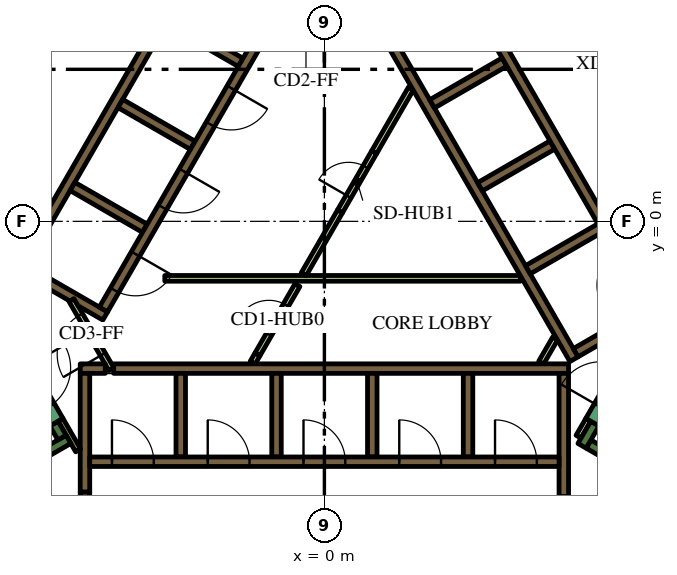
"""IFC4 building model, lengths in metres.
Left out: names, types, materials, properties, quantities, classifications, styles, units other than length and angle.
Written with IfcOpenShell. Run it as: python <this file> out.ifc"""

import sys

from ifc_helpers import new_model, si_unit, direction, frame, frame_2d, origin, place, context, subcontext, project, spatial, polyline, rectangle, outline, extrude, element, fill, save


model = new_model("IFC4")
c1 = context("Model", 3, precision=1e-05, world=origin(), true_north=direction((0.0, 1.0)))
c2 = subcontext(c1, "Body", "Model", "MODEL_VIEW")
j1 = project(units=[si_unit("LENGTHUNIT", "METRE"), si_unit("PLANEANGLEUNIT", "RADIAN")], contexts=[c1])
p1 = place(None, origin())
s1 = spatial("IfcSite", under=j1, at=p1, CompositionType="ELEMENT")
p2 = place(p1, origin())
s2 = spatial("IfcBuilding", under=s1, at=p2, CompositionType="ELEMENT")
p3 = place(p2, frame((0.0, 0.0, 171.0)))
s3 = spatial("IfcBuildingStorey", under=s2, at=p3, CompositionType="ELEMENT", Elevation=171.0)
p4 = place(p3, frame((-12.668, -1.842, 0.0), z_axis=(0.0, 0.0, 1.0), x_axis=(0.500003640647, 0.866023301845, 0.0)))
e1 = element("IfcWall", 1, at=p4, inside=s3, PredefinedType="SOLIDWALL", context=c2, shape_type="SweptSolid", body=[
    extrude(rectangle(XDim=15.858, YDim=0.8, at=frame_2d((7.929, 0.0))), origin(), (0.0, 0.0, 1.0), 4.2),
])
p5 = place(p3, frame((12.84, -9.261, 0.0), z_axis=(0.0, 0.0, 1.0), x_axis=(-0.866013990052, 0.500019768644, 0.0)))
e2 = element("IfcWall", 2, at=p5, inside=s3, PredefinedType="SOLIDWALL", context=c2, shape_type="SweptSolid", body=[
    extrude(rectangle(XDim=6.8, YDim=0.25, at=frame_2d((3.4, 0.0))), origin(), (0.0, 0.0, 1.0), 4.2),
])
p6 = place(p3, frame((6.78, -5.906, 0.0), z_axis=(0.0, 0.0, 1.0), x_axis=(0.500223362819, 0.865896406789, 0.0)))
e3 = element("IfcWall", 3, at=p6, inside=s3, PredefinedType="SOLIDWALL", context=c2, shape_type="SweptSolid", body=[
    extrude(rectangle(XDim=0.675, YDim=0.25, at=frame_2d((0.337, 0.0))), origin(), (0.0, 0.0, 1.0), 4.2),
])
p7 = place(p3, frame((-12.84, -9.261, 0.0), z_axis=(0.0, 0.0, 1.0), x_axis=(0.866016039709, 0.500016218704, 0.0)))
e4 = element("IfcWall", 4, at=p7, inside=s3, PredefinedType="SOLIDWALL", context=c2, shape_type="SweptSolid", body=[
    extrude(rectangle(XDim=7.05, YDim=0.25, at=frame_2d((3.525, 0.0))), origin(), (0.0, 0.0, 1.0), 4.2),
])
p8 = place(p3, frame((-6.905, -5.69, 0.0), z_axis=(0.0, 0.0, 1.0), x_axis=(-0.500402024738, 0.865793170242, 0.0)))
e5 = element("IfcWall", 5, at=p8, inside=s3, PredefinedType="SOLIDWALL", context=c2, shape_type="SweptSolid", body=[
    extrude(rectangle(XDim=0.425, YDim=0.25, at=frame_2d((0.212, 0.0))), origin(), (0.0, 0.0, 1.0), 4.2),
])
p9 = place(p3, frame((-5.545, -3.875, 0.0), z_axis=(0.0, 0.0, 1.0), x_axis=(1.0, 0.0, 0.0)))
e6 = element("IfcWall", 6, at=p9, inside=s3, PredefinedType="SOLIDWALL", context=c2, shape_type="SweptSolid", body=[
    extrude(rectangle(XDim=11.97, YDim=0.25, at=frame_2d((5.985, 0.0))), origin(), (0.0, 0.0, 1.0), 4.2),
])
p10 = place(p3, frame((-6.425, -3.875, 0.0), z_axis=(0.0, 0.0, 1.0), x_axis=(1.0, 0.0, 0.0)))
e7 = element("IfcWall", 7, at=p10, inside=s3, PredefinedType="SOLIDWALL", context=c2, shape_type="SweptSolid", body=[
    extrude(rectangle(XDim=0.658, YDim=0.25, at=frame_2d((0.329, 0.0))), origin(), (0.0, 0.0, 1.0), 4.2),
])
p11 = place(p3, frame((6.3, -7.24, 0.0), z_axis=(0.0, 0.0, 1.0), x_axis=(0.0, 1.0, 0.0)))
e8 = element("IfcWall", 8, at=p11, inside=s3, PredefinedType="SOLIDWALL", context=c2, shape_type="SweptSolid", body=[
    extrude(rectangle(XDim=3.24, YDim=0.25, at=frame_2d((1.62, 0.0))), origin(), (0.0, 0.0, 1.0), 4.2),
])
for number, where, z_axis, x_axis in (
    (9, (3.78, -4.0, 0.0), (0.0, 0.0, 1.0), (0.0, -1.0, 0.0)),
    (10, (1.26, -4.0, 0.0), (0.0, 0.0, 1.0), (0.0, -1.0, 0.0)),
    (11, (-1.26, -4.0, 0.0), (0.0, 0.0, 1.0), (0.0, -1.0, 0.0)),
    (12, (-3.78, -4.0, 0.0), (0.0, 0.0, 1.0), (0.0, -1.0, 0.0)),
):
    element("IfcWall", number, at=place(p3, frame(where, z_axis=z_axis, x_axis=x_axis)), inside=s3, PredefinedType="SOLIDWALL", context=c2, shape_type="SweptSolid", body=[
        extrude(rectangle(XDim=2.2, YDim=0.25, at=frame_2d((1.1, 0.0))), origin(), (0.0, 0.0, 1.0), 4.2),
    ])
p12 = place(p3, frame((-6.3, -7.125, 0.0), z_axis=(0.0, 0.0, 1.0), x_axis=(0.0, 1.0, 0.0)))
e13 = element("IfcWall", 13, at=p12, inside=s3, PredefinedType="SOLIDWALL", context=c2, shape_type="SweptSolid", body=[
    extrude(rectangle(XDim=3.125, YDim=0.25, at=frame_2d((1.562, 0.0))), origin(), (0.0, 0.0, 1.0), 4.2),
])
p13 = place(p3, frame((6.568, -3.627, 0.0), z_axis=(0.0, 0.0, 1.0), x_axis=(-0.499999455981, 0.866025717874, 0.0)))
e14 = element("IfcWall", 14, at=p13, inside=s3, PredefinedType="SOLIDWALL", context=c2, shape_type="SweptSolid", body=[
    extrude(rectangle(XDim=11.978, YDim=0.25, at=frame_2d((5.989, 0.0))), origin(), (0.0, 0.0, 1.0), 4.2),
])
for number, where, z_axis, x_axis in (
    (15, (2.834, 3.091, 0.0), (0.0, 0.0, 1.0), (0.866, 0.5, 0.0)),
    (16, (4.094, 0.909, 0.0), (0.0, 0.0, 1.0), (0.866, 0.5, 0.0)),
    (17, (5.354, -1.274, 0.0), (0.0, 0.0, 1.0), (0.866, 0.5, 0.0)),
):
    element("IfcWall", number, at=place(p3, frame(where, z_axis=z_axis, x_axis=x_axis)), inside=s3, PredefinedType="SOLIDWALL", context=c2, shape_type="SweptSolid", body=[
        extrude(rectangle(XDim=2.2, YDim=0.25, at=frame_2d((1.1, 0.0))), origin(), (0.0, 0.0, 1.0), 4.2),
    ])
p14 = place(p3, frame((6.614, -3.456, 0.0), z_axis=(0.0, 0.0, 1.0), x_axis=(0.866025089694, 0.500000544019, 0.0)))
e18 = element("IfcWall", 18, at=p14, inside=s3, PredefinedType="SOLIDWALL", context=c2, shape_type="SweptSolid", body=[
    extrude(rectangle(XDim=2.305, YDim=0.25, at=frame_2d((1.153, 0.0))), origin(), (0.0, 0.0, 1.0), 4.2),
])
p15 = place(p3, frame((-8.06, -1.311, 0.0), z_axis=(0.0, 0.0, 1.0), x_axis=(0.50000273126, 0.866023826885, 0.0)))
e19 = element("IfcWall", 19, at=p15, inside=s3, PredefinedType="SOLIDWALL", context=c2, shape_type="SweptSolid", body=[
    extrude(rectangle(XDim=10.33, YDim=0.25, at=frame_2d((5.165, 0.0))), origin(), (0.0, 0.0, 1.0), 4.2),
])
for number, where, z_axis, x_axis in (
    (20, (-2.204, 4.182, 0.0), (0.0, 0.0, 1.0), (-0.866, 0.5, 0.0)),
    (21, (-5.369, 3.1, 0.0), (0.0, 0.0, 1.0), (0.866, -0.5, 0.0)),
    (22, (-4.724, -0.182, 0.0), (0.0, 0.0, 1.0), (-0.866, 0.5, 0.0)),
):
    element("IfcWall", number, at=place(p3, frame(where, z_axis=z_axis, x_axis=x_axis)), inside=s3, PredefinedType="SOLIDWALL", context=c2, shape_type="SweptSolid", body=[
        extrude(rectangle(XDim=2.2, YDim=0.25, at=frame_2d((1.1, 0.0))), origin(), (0.0, 0.0, 1.0), 4.2),
    ])
p16 = place(p3, origin())
e23 = element("IfcWall", 23, at=p16, inside=s3, PredefinedType="SOLIDWALL", context=c2, shape_type="SweptSolid", body=[
    extrude(outline(polyline([(-5.922, -2.257), (-5.922, -2.257), (-5.705, -2.382), (-5.83, -2.598), (-6.483, -2.221), (-6.591, -2.033), (-6.591, -2.033), (-6.7, -2.096), (-7.952, -1.373), (-7.827, -1.156), (-5.922, -2.257)])), origin(), (0.0, 0.0, 1.0), 4.2),
])
p17 = place(p3, frame((-6.48, -6.027, 0.0), z_axis=(0.0, 0.0, 1.0), x_axis=(-0.499927229454, 0.866067413802, 0.0)))
e24 = element("IfcWall", 24, at=p17, inside=s3, PredefinedType="PARTITIONING", context=c2, shape_type="SweptSolid", body=[
    extrude(rectangle(XDim=0.929, YDim=0.15, at=frame_2d((0.464, 0.0))), origin(), (0.0, 0.0, 1.0), 4.2),
])
p18 = place(p3, frame((6.945, -5.222, 0.0), z_axis=(0.0, 0.0, 1.0), x_axis=(-0.499818422106, -0.866130212453, 0.0)))
e25 = element("IfcWall", 25, at=p18, inside=s3, PredefinedType="PARTITIONING", context=c2, shape_type="SweptSolid", body=[
    extrude(rectangle(XDim=0.514, YDim=0.15, at=frame_2d((0.257, 0.0))), origin(), (0.0, 0.0, 1.0), 3.15),
])
p19 = place(p3, frame((5.705, -3.718, 0.0), z_axis=(0.0, 0.0, 1.0), x_axis=(0.499962090823, 0.866047289552, 0.0)))
e26 = element("IfcWall", 26, at=p19, inside=s3, PredefinedType="PARTITIONING", context=c2, shape_type="SweptSolid", body=[
    extrude(rectangle(XDim=0.735, YDim=0.15, at=frame_2d((0.367, 0.0))), origin(), (0.0, 0.0, 1.0), 3.15),
])
p20 = place(p3, frame((-4.2, -1.5, 0.0), z_axis=(0.0, 0.0, 1.0), x_axis=(1.0, 0.0, 0.0)))
e27 = element("IfcWall", 27, at=p20, inside=s3, PredefinedType="PARTITIONING", context=c2, shape_type="SweptSolid", body=[
    extrude(rectangle(XDim=9.359, YDim=0.15, at=frame_2d((4.68, 0.0))), origin(), (0.0, 0.0, 1.0), 3.15),
])
p21 = place(p3, frame((-0.544, -1.393, 0.0), z_axis=(0.0, 0.0, 1.0), x_axis=(0.499928740635, 0.866066541489, 0.0)))
e28 = element("IfcWall", 28, at=p21, inside=s3, PredefinedType="PARTITIONING", context=c2, shape_type="SweptSolid", body=[
    extrude(rectangle(XDim=1.912, YDim=0.15, at=frame_2d((0.956, 0.0))), origin(), (0.0, 0.0, 1.0), 3.15),
])
p22 = place(p3, frame((1.312, 1.822, 0.0), z_axis=(0.0, 0.0, 1.0), x_axis=(0.500003549559, 0.866023354436, 0.0)))
e29 = element("IfcWall", 29, at=p22, inside=s3, PredefinedType="PARTITIONING", context=c2, shape_type="SweptSolid", body=[
    extrude(rectangle(XDim=1.93, YDim=0.15, at=frame_2d((0.965, 0.0))), origin(), (0.0, 0.0, 1.0), 3.15),
])
p23 = place(p3, frame((-1.887, -3.718, 0.0), z_axis=(0.0, 0.0, 1.0), x_axis=(0.500165633897, 0.865929753888, 0.0)))
e30 = element("IfcWall", 30, at=p23, inside=s3, PredefinedType="PARTITIONING", context=c2, shape_type="SweptSolid", body=[
    extrude(rectangle(XDim=0.254, YDim=0.15, at=frame_2d((0.127, 0.0))), origin(), (0.0, 0.0, 1.0), 3.15),
])
p24 = place(p3, frame((-6.175, -6.325, 0.0), z_axis=(0.0, 0.0, 1.0), x_axis=(1.0, 0.0, 0.0)))
e31 = element("IfcWall", 31, at=p24, inside=s3, PredefinedType="SOLIDWALL", context=c2, shape_type="SweptSolid", body=[
    extrude(rectangle(XDim=12.35, YDim=0.25, at=frame_2d((6.175, 0.0))), origin(), (0.0, 0.0, 1.0), 4.2),
])
p25 = place(p24, frame((0.585, 0.0, 0.0)))
e32 = element("IfcOpeningElement", 32, at=p25, cuts=e31, PredefinedType="OPENING", context=c2, shape_type="SweptSolid", body=[
    extrude(rectangle(XDim=1.1, YDim=2.1, at=frame_2d((0.55, 1.05))), frame((0.0, 0.135, 0.0), z_axis=(0.0, -1.0, 0.0), x_axis=(1.0, 0.0, 0.0)), (0.0, 0.0, 1.0), 0.27),
])
p26 = place(p24, frame((3.105, 0.0, 0.0)))
e33 = element("IfcOpeningElement", 33, at=p26, cuts=e31, PredefinedType="OPENING", context=c2, shape_type="SweptSolid", body=[
    extrude(rectangle(XDim=1.1, YDim=2.1, at=frame_2d((0.55, 1.05))), frame((0.0, 0.135, 0.0), z_axis=(0.0, -1.0, 0.0), x_axis=(1.0, 0.0, 0.0)), (0.0, 0.0, 1.0), 0.27),
])
p27 = place(p24, frame((5.625, 0.0, 0.0)))
e34 = element("IfcOpeningElement", 34, at=p27, cuts=e31, PredefinedType="OPENING", context=c2, shape_type="SweptSolid", body=[
    extrude(rectangle(XDim=1.1, YDim=2.1, at=frame_2d((0.55, 1.05))), frame((0.0, 0.135, 0.0), z_axis=(0.0, -1.0, 0.0), x_axis=(1.0, 0.0, 0.0)), (0.0, 0.0, 1.0), 0.27),
])
p28 = place(p24, frame((8.145, 0.0, 0.0)))
e35 = element("IfcOpeningElement", 35, at=p28, cuts=e31, PredefinedType="OPENING", context=c2, shape_type="SweptSolid", body=[
    extrude(rectangle(XDim=1.1, YDim=2.1, at=frame_2d((0.55, 1.05))), frame((0.0, 0.135, 0.0), z_axis=(0.0, -1.0, 0.0), x_axis=(1.0, 0.0, 0.0)), (0.0, 0.0, 1.0), 0.27),
])
p29 = place(p24, frame((10.665, 0.0, 0.0)))
e36 = element("IfcOpeningElement", 36, at=p29, cuts=e31, PredefinedType="OPENING", context=c2, shape_type="SweptSolid", body=[
    extrude(rectangle(XDim=1.1, YDim=2.1, at=frame_2d((0.55, 1.05))), frame((0.0, 0.135, 0.0), z_axis=(0.0, -1.0, 0.0), x_axis=(1.0, 0.0, 0.0)), (0.0, 0.0, 1.0), 0.27),
])
p30 = place(p3, frame((8.565, -2.185, 0.0), z_axis=(0.0, 0.0, 1.0), x_axis=(-0.499997954832, 0.866026584559, 0.0)))
e37 = element("IfcWall", 37, at=p30, inside=s3, PredefinedType="SOLIDWALL", context=c2, shape_type="SweptSolid", body=[
    extrude(rectangle(XDim=12.35, YDim=0.25, at=frame_2d((6.175, 0.0))), origin(), (0.0, 0.0, 1.0), 4.2),
])
p31 = place(p30, frame((0.585, 0.0, 0.0)))
e38 = element("IfcOpeningElement", 38, at=p31, cuts=e37, PredefinedType="OPENING", context=c2, shape_type="SweptSolid", body=[
    extrude(rectangle(XDim=1.1, YDim=2.1, at=frame_2d((0.55, 1.05))), frame((0.0, 0.135, 0.0), z_axis=(0.0, -1.0, 0.0), x_axis=(1.0, 0.0, 0.0)), (0.0, 0.0, 1.0), 0.27),
])
p32 = place(p3, frame((-0.898, 6.194, 0.0), z_axis=(0.0, 0.0, 1.0), x_axis=(-0.499996202215, -0.866027596426, 0.0)))
e39 = element("IfcWall", 39, at=p32, inside=s3, PredefinedType="SOLIDWALL", context=c2, shape_type="SweptSolid", body=[
    extrude(rectangle(XDim=9.83, YDim=0.25, at=frame_2d((4.915, 0.0))), origin(), (0.0, 0.0, 1.0), 4.2),
])
p33 = place(p32, frame((0.585, 0.0, 0.0)))
e40 = element("IfcOpeningElement", 40, at=p33, cuts=e39, PredefinedType="OPENING", context=c2, shape_type="SweptSolid", body=[
    extrude(rectangle(XDim=1.1, YDim=2.1, at=frame_2d((0.55, 1.05))), frame((0.0, 0.135, 0.0), z_axis=(0.0, -1.0, 0.0), x_axis=(1.0, 0.0, 0.0)), (0.0, 0.0, 1.0), 0.27),
])
p34 = place(p32, frame((3.105, 0.0, 0.0)))
e41 = element("IfcOpeningElement", 41, at=p34, cuts=e39, PredefinedType="OPENING", context=c2, shape_type="SweptSolid", body=[
    extrude(rectangle(XDim=1.1, YDim=2.1, at=frame_2d((0.55, 1.05))), frame((0.0, 0.135, 0.0), z_axis=(0.0, -1.0, 0.0), x_axis=(1.0, 0.0, 0.0)), (0.0, 0.0, 1.0), 0.27),
])
p35 = place(p32, frame((5.625, 0.0, 0.0)))
e42 = element("IfcOpeningElement", 42, at=p35, cuts=e39, PredefinedType="OPENING", context=c2, shape_type="SweptSolid", body=[
    extrude(rectangle(XDim=1.1, YDim=2.1, at=frame_2d((0.55, 1.05))), frame((0.0, 0.135, 0.0), z_axis=(0.0, -1.0, 0.0), x_axis=(1.0, 0.0, 0.0)), (0.0, 0.0, 1.0), 0.27),
])
p36 = place(p32, frame((8.145, 0.0, 0.0)))
e43 = element("IfcOpeningElement", 43, at=p36, cuts=e39, PredefinedType="OPENING", context=c2, shape_type="SweptSolid", body=[
    extrude(rectangle(XDim=1.1, YDim=2.1, at=frame_2d((0.55, 1.05))), frame((0.0, 0.135, 0.0), z_axis=(0.0, -1.0, 0.0), x_axis=(1.0, 0.0, 0.0)), (0.0, 0.0, 1.0), 0.27),
])
p37 = place(p3, frame((7.053, -5.284, 0.0), z_axis=(0.0, 0.0, 1.0), x_axis=(0.500078061341, 0.865980330357, 0.0)))
e44 = element("IfcWall", 44, at=p37, inside=s3, PredefinedType="SOLIDWALL", context=c2, shape_type="SweptSolid", body=[
    extrude(rectangle(XDim=2.1, YDim=0.4, at=frame_2d((1.05, 0.0))), origin(), (0.0, 0.0, 1.0), 4.2),
])
p38 = place(p37, frame((0.45, 0.0, 0.0)))
e45 = element("IfcOpeningElement", 45, at=p38, cuts=e44, PredefinedType="OPENING", context=c2, shape_type="SweptSolid", body=[
    extrude(rectangle(XDim=1.2, YDim=2.1, at=frame_2d((0.6, 1.05))), frame((0.0, 0.21, 0.0), z_axis=(0.0, -1.0, 0.0), x_axis=(1.0, 0.0, 0.0)), (0.0, 0.0, 1.0), 0.42),
])
p39 = place(p3, frame((-8.103, -3.466, 0.0), z_axis=(0.0, 0.0, 1.0), x_axis=(0.500078061341, -0.865980330357, 0.0)))
e46 = element("IfcWall", 46, at=p39, inside=s3, PredefinedType="SOLIDWALL", context=c2, shape_type="SweptSolid", body=[
    extrude(rectangle(XDim=2.1, YDim=0.4, at=frame_2d((1.05, 0.0))), origin(), (0.0, 0.0, 1.0), 4.2),
])
p40 = place(p39, frame((0.45, 0.0, 0.0)))
e47 = element("IfcOpeningElement", 47, at=p40, cuts=e46, PredefinedType="OPENING", context=c2, shape_type="SweptSolid", body=[
    extrude(rectangle(XDim=1.2, YDim=2.1, at=frame_2d((0.6, 1.05))), frame((0.0, 0.21, 0.0), z_axis=(0.0, -1.0, 0.0), x_axis=(1.0, 0.0, 0.0)), (0.0, 0.0, 1.0), 0.42),
])
p41 = place(p3, frame((-6.3, -7.125, 0.0), z_axis=(0.0, 0.0, 1.0), x_axis=(0.0, -1.0, 0.0)))
e48 = element("IfcWall", 48, at=p41, inside=s3, PredefinedType="SOLIDWALL", context=c2, shape_type="SweptSolid", body=[
    extrude(rectangle(XDim=1.8, YDim=0.25, at=frame_2d((0.9, 0.0))), origin(), (0.0, 0.0, 1.0), 4.2),
])
p42 = place(p41, frame((0.45, 0.0, 0.0)))
e49 = element("IfcOpeningElement", 49, at=p42, cuts=e48, PredefinedType="OPENING", context=c2, shape_type="SweptSolid", body=[
    extrude(rectangle(XDim=0.9, YDim=2.1, at=frame_2d((0.45, 1.05))), frame((0.0, 0.135, 0.0), z_axis=(0.0, -1.0, 0.0), x_axis=(1.0, 0.0, 0.0)), (0.0, 0.0, 1.0), 0.27),
])
p43 = place(p3, frame((-1.76, -3.498, 0.0), z_axis=(0.0, 0.0, 1.0), x_axis=(0.499977374825, 0.866038466041, 0.0)))
e50 = element("IfcWall", 50, at=p43, inside=s3, PredefinedType="PARTITIONING", context=c2, shape_type="SweptSolid", body=[
    extrude(rectangle(XDim=2.1, YDim=0.15, at=frame_2d((1.05, 0.0))), origin(), (0.0, 0.0, 1.0), 3.15),
])
p44 = place(p43, frame((0.6, 0.0, 0.0)))
e51 = element("IfcOpeningElement", 51, at=p44, cuts=e50, PredefinedType="OPENING", context=c2, shape_type="SweptSolid", body=[
    extrude(rectangle(XDim=0.9, YDim=2.1, at=frame_2d((0.45, 1.05))), frame((0.0, 0.085, 0.0), z_axis=(0.0, -1.0, 0.0), x_axis=(1.0, 0.0, 0.0)), (0.0, 0.0, 1.0), 0.17),
])
p45 = place(p3, frame((-5.606, -3.89, 0.0), z_axis=(0.0, 0.0, 1.0), x_axis=(-0.500027713859, 0.866009402589, 0.0)))
e52 = element("IfcWall", 52, at=p45, inside=s3, PredefinedType="PARTITIONING", context=c2, shape_type="SweptSolid", body=[
    extrude(rectangle(XDim=2.1, YDim=0.15, at=frame_2d((1.05, 0.0))), origin(), (0.0, 0.0, 1.0), 3.15),
])
p46 = place(p45, frame((0.45, 0.0, 0.0)))
e53 = element("IfcOpeningElement", 53, at=p46, cuts=e52, PredefinedType="OPENING", context=c2, shape_type="SweptSolid", body=[
    extrude(rectangle(XDim=1.2, YDim=2.1, at=frame_2d((0.6, 1.05))), frame((0.0, 0.085, 0.0), z_axis=(0.0, -1.0, 0.0), x_axis=(1.0, 0.0, 0.0)), (0.0, 0.0, 1.0), 0.17),
])
p47 = place(p3, frame((0.412, 0.263, 0.0), z_axis=(0.0, 0.0, 1.0), x_axis=(0.500062916607, 0.865989075817, 0.0)))
e54 = element("IfcWall", 54, at=p47, inside=s3, PredefinedType="PARTITIONING", context=c2, shape_type="SweptSolid", body=[
    extrude(rectangle(XDim=1.8, YDim=0.15, at=frame_2d((0.9, 0.0))), origin(), (0.0, 0.0, 1.0), 3.15),
])
p48 = place(p47, frame((0.45, 0.0, 0.0)))
e55 = element("IfcOpeningElement", 55, at=p48, cuts=e54, PredefinedType="OPENING", context=c2, shape_type="SweptSolid", body=[
    extrude(rectangle(XDim=0.9, YDim=2.1, at=frame_2d((0.45, 1.05))), frame((0.0, 0.085, 0.0), z_axis=(0.0, -1.0, 0.0), x_axis=(1.0, 0.0, 0.0)), (0.0, 0.0, 1.0), 0.17),
])
p49 = place(p25, origin())
e56 = element("IfcDoor", 56, at=p49, inside=s3, OperationType="DOUBLE_DOOR_SLIDING", PredefinedType="DOOR", context=c2, shape_type="SweptSolid", body=[
    extrude(rectangle(XDim=1.1, YDim=2.1, at=frame_2d((0.55, 1.05))), frame((0.0, 0.025, 0.0), z_axis=(0.0, -1.0, 0.0), x_axis=(1.0, 0.0, 0.0)), (0.0, 0.0, 1.0), 0.05),
])
fill(e32, e56)
p50 = place(p26, origin())
e57 = element("IfcDoor", 57, at=p50, inside=s3, OperationType="DOUBLE_DOOR_SLIDING", PredefinedType="DOOR", context=c2, shape_type="SweptSolid", body=[
    extrude(rectangle(XDim=1.1, YDim=2.1, at=frame_2d((0.55, 1.05))), frame((0.0, 0.025, 0.0), z_axis=(0.0, -1.0, 0.0), x_axis=(1.0, 0.0, 0.0)), (0.0, 0.0, 1.0), 0.05),
])
fill(e33, e57)
p51 = place(p27, origin())
e58 = element("IfcDoor", 58, at=p51, inside=s3, OperationType="DOUBLE_DOOR_SLIDING", PredefinedType="DOOR", context=c2, shape_type="SweptSolid", body=[
    extrude(rectangle(XDim=1.1, YDim=2.1, at=frame_2d((0.55, 1.05))), frame((0.0, 0.025, 0.0), z_axis=(0.0, -1.0, 0.0), x_axis=(1.0, 0.0, 0.0)), (0.0, 0.0, 1.0), 0.05),
])
fill(e34, e58)
p52 = place(p28, origin())
e59 = element("IfcDoor", 59, at=p52, inside=s3, OperationType="DOUBLE_DOOR_SLIDING", PredefinedType="DOOR", context=c2, shape_type="SweptSolid", body=[
    extrude(rectangle(XDim=1.1, YDim=2.1, at=frame_2d((0.55, 1.05))), frame((0.0, 0.025, 0.0), z_axis=(0.0, -1.0, 0.0), x_axis=(1.0, 0.0, 0.0)), (0.0, 0.0, 1.0), 0.05),
])
fill(e35, e59)
p53 = place(p29, origin())
e60 = element("IfcDoor", 60, at=p53, inside=s3, OperationType="DOUBLE_DOOR_SLIDING", PredefinedType="DOOR", context=c2, shape_type="SweptSolid", body=[
    extrude(rectangle(XDim=1.1, YDim=2.1, at=frame_2d((0.55, 1.05))), frame((0.0, 0.025, 0.0), z_axis=(0.0, -1.0, 0.0), x_axis=(1.0, 0.0, 0.0)), (0.0, 0.0, 1.0), 0.05),
])
fill(e36, e60)
p54 = place(p34, origin())
e61 = element("IfcDoor", 61, at=p54, inside=s3, OperationType="DOUBLE_DOOR_SLIDING", PredefinedType="DOOR", context=c2, shape_type="SweptSolid", body=[
    extrude(rectangle(XDim=1.1, YDim=2.1, at=frame_2d((0.55, 1.05))), frame((0.0, 0.025, 0.0), z_axis=(0.0, -1.0, 0.0), x_axis=(1.0, 0.0, 0.0)), (0.0, 0.0, 1.0), 0.05),
])
fill(e41, e61)
p55 = place(p35, origin())
e62 = element("IfcDoor", 62, at=p55, inside=s3, OperationType="DOUBLE_DOOR_SLIDING", PredefinedType="DOOR", context=c2, shape_type="SweptSolid", body=[
    extrude(rectangle(XDim=1.1, YDim=2.1, at=frame_2d((0.55, 1.05))), frame((0.0, 0.025, 0.0), z_axis=(0.0, -1.0, 0.0), x_axis=(1.0, 0.0, 0.0)), (0.0, 0.0, 1.0), 0.05),
])
fill(e42, e62)
p56 = place(p36, origin())
e63 = element("IfcDoor", 63, at=p56, inside=s3, OperationType="DOUBLE_DOOR_SLIDING", PredefinedType="DOOR", context=c2, shape_type="SweptSolid", body=[
    extrude(rectangle(XDim=1.1, YDim=2.1, at=frame_2d((0.55, 1.05))), frame((0.0, 0.025, 0.0), z_axis=(0.0, -1.0, 0.0), x_axis=(1.0, 0.0, 0.0)), (0.0, 0.0, 1.0), 0.05),
])
fill(e43, e63)
p57 = place(p44, origin())
e64 = element("IfcDoor", 64, at=p57, inside=s3, OperationType="SINGLE_SWING_LEFT", PredefinedType="DOOR", context=c2, shape_type="SweptSolid", body=[
    extrude(rectangle(XDim=0.9, YDim=2.1, at=frame_2d((0.45, 1.05))), frame((0.0, 0.025, 0.0), z_axis=(0.0, -1.0, 0.0), x_axis=(1.0, 0.0, 0.0)), (0.0, 0.0, 1.0), 0.05),
])
fill(e51, e64)
p58 = place(p46, origin())
e65 = element("IfcDoor", 65, at=p58, inside=s3, OperationType="SINGLE_SWING_LEFT", PredefinedType="DOOR", context=c2, shape_type="SweptSolid", body=[
    extrude(rectangle(XDim=1.2, YDim=2.1, at=frame_2d((0.6, 1.05))), frame((0.0, 0.025, 0.0), z_axis=(0.0, -1.0, 0.0), x_axis=(1.0, 0.0, 0.0)), (0.0, 0.0, 1.0), 0.05),
])
fill(e53, e65)
p59 = place(p48, origin())
e66 = element("IfcDoor", 66, at=p59, inside=s3, OperationType="SINGLE_SWING_LEFT", PredefinedType="DOOR", context=c2, shape_type="SweptSolid", body=[
    extrude(rectangle(XDim=0.9, YDim=2.1, at=frame_2d((0.45, 1.05))), frame((0.0, 0.025, 0.0), z_axis=(0.0, -1.0, 0.0), x_axis=(1.0, 0.0, 0.0)), (0.0, 0.0, 1.0), 0.05),
])
fill(e55, e66)
save(model, sys.argv[1])
